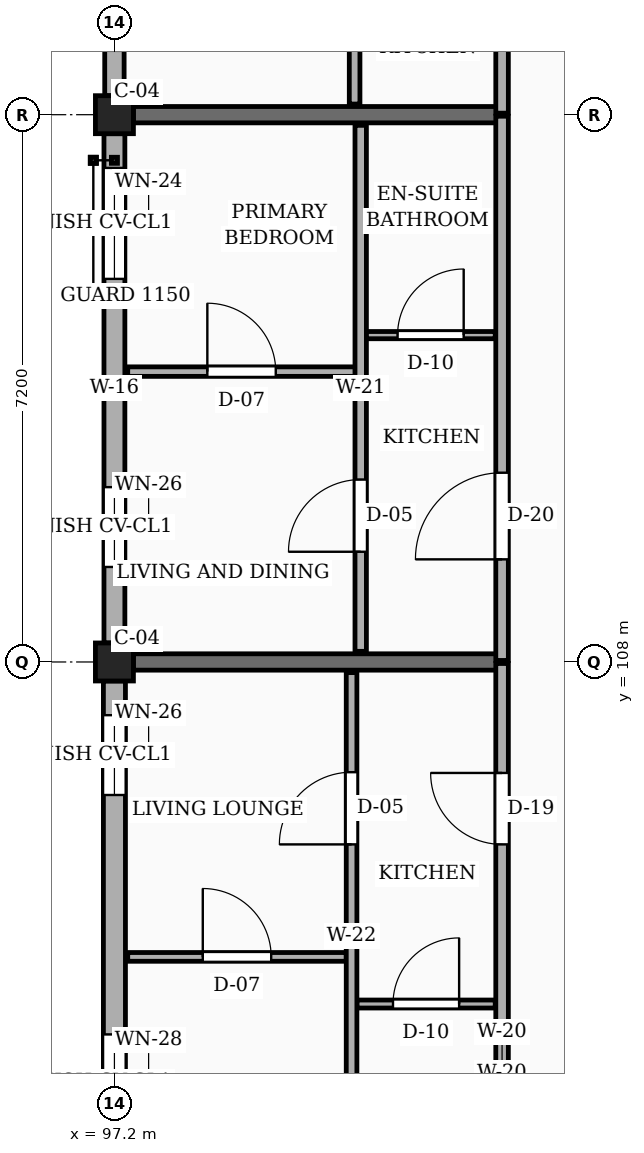
"""IFC4 building model, lengths in metres.
Left out: names, types, materials, properties, quantities, classifications, styles, units other than length and angle.
Written with IfcOpenShell. Run it as: python <this file> out.ifc"""

import sys

from ifc_helpers import new_model, si_unit, direction, frame, frame_2d, origin, origin_2d, place, context, subcontext, project, spatial, rectangle, extrude, element, fill, save


model = new_model("IFC4")
c1 = context("Model", 3, precision=1e-05, world=origin(), true_north=direction((0.0, 1.0)))
c2 = subcontext(c1, "Body", "Model", "MODEL_VIEW")
j1 = project(units=[si_unit("LENGTHUNIT", "METRE"), si_unit("PLANEANGLEUNIT", "RADIAN")], contexts=[c1])
p1 = place(None, origin())
s1 = spatial("IfcSite", under=j1, at=p1, CompositionType="ELEMENT")
p2 = place(p1, origin())
s2 = spatial("IfcBuilding", under=s1, at=p2, CompositionType="ELEMENT")
p3 = place(p2, frame((0.0, 0.0, 26.55)))
s3 = spatial("IfcBuildingStorey", under=s2, at=p3, CompositionType="ELEMENT", Elevation=26.55)
for number, where, z_axis, x_axis in (
    (1, (97.2, 108.0, 0.0), (0.0, 0.0, 1.0), (1.0, 0.0, 0.0)),
    (2, (97.2, 115.2, 0.0), (0.0, 0.0, 1.0), (1.0, 0.0, 0.0)),
):
    element("IfcColumn", number, at=place(p3, frame(where, z_axis=z_axis, x_axis=x_axis)), inside=s3, PredefinedType="COLUMN", context=c2, shape_type="SweptSolid", body=[
        extrude(rectangle(XDim=0.5, YDim=0.5, at=origin_2d()), origin(), (0.0, 0.0, 1.0), 3.15),
    ])
for number, where, z_axis, x_axis in (
    (3, (97.45, 108.0, 0.0), (0.0, 0.0, 1.0), (1.0, 0.0, 0.0)),
    (4, (97.45, 115.2, 0.0), (0.0, 0.0, 1.0), (1.0, 0.0, 0.0)),
):
    element("IfcWall", number, at=place(p3, frame(where, z_axis=z_axis, x_axis=x_axis)), inside=s3, PredefinedType="SOLIDWALL", context=c2, shape_type="SweptSolid", body=[
        extrude(rectangle(XDim=4.85, YDim=0.215, at=frame_2d((2.425, 0.0))), origin(), (0.0, 0.0, 1.0), 2.19),
    ])
p4 = place(p3, frame((97.2, 122.15, 0.0), z_axis=(0.0, 0.0, 1.0), x_axis=(0.0, -1.0, 0.0)))
e5 = element("IfcWall", 5, at=p4, inside=s3, PredefinedType="SOLIDWALL", context=c2, shape_type="SweptSolid", body=[
    extrude(rectangle(XDim=6.7, YDim=0.255, at=frame_2d((3.35, 0.0))), origin(), (0.0, 0.0, 1.0), 2.46),
])
p5 = place(p4, frame((0.45, 0.0, 0.78)))
e6 = element("IfcOpeningElement", 6, at=p5, cuts=e5, PredefinedType="OPENING", context=c2, shape_type="SweptSolid", body=[
    extrude(rectangle(XDim=1.3, YDim=1.36, at=frame_2d((0.65, 0.68))), frame((0.0, 0.137, 0.0), z_axis=(0.0, -1.0, 0.0), x_axis=(1.0, 0.0, 0.0)), (0.0, 0.0, 1.0), 0.275),
])
p6 = place(p4, frame((4.65, 0.0, 0.78)))
e7 = element("IfcOpeningElement", 7, at=p6, cuts=e5, PredefinedType="OPENING", context=c2, shape_type="SweptSolid", body=[
    extrude(rectangle(XDim=1.46, YDim=1.36, at=frame_2d((0.73, 0.68))), frame((0.0, 0.137, 0.0), z_axis=(0.0, -1.0, 0.0), x_axis=(1.0, 0.0, 0.0)), (0.0, 0.0, 1.0), 0.275),
])
p7 = place(p3, frame((97.2, 114.95, 0.0), z_axis=(0.0, 0.0, 1.0), x_axis=(0.0, -1.0, 0.0)))
e8 = element("IfcWall", 8, at=p7, inside=s3, PredefinedType="SOLIDWALL", context=c2, shape_type="SweptSolid", body=[
    extrude(rectangle(XDim=6.7, YDim=0.275, at=frame_2d((3.35, 0.0))), origin(), (0.0, 0.0, 1.0), 2.46),
])
p8 = place(p7, frame((0.45, 0.0, 0.78)))
e9 = element("IfcOpeningElement", 9, at=p8, cuts=e8, PredefinedType="OPENING", context=c2, shape_type="SweptSolid", body=[
    extrude(rectangle(XDim=1.46, YDim=1.36, at=frame_2d((0.73, 0.68))), frame((0.0, 0.147, 0.0), z_axis=(0.0, -1.0, 0.0), x_axis=(1.0, 0.0, 0.0)), (0.0, 0.0, 1.0), 0.295),
])
p9 = place(p7, frame((4.65, 0.0, 0.78)))
e10 = element("IfcOpeningElement", 10, at=p9, cuts=e8, PredefinedType="OPENING", context=c2, shape_type="SweptSolid", body=[
    extrude(rectangle(XDim=1.05, YDim=1.44, at=frame_2d((0.525, 0.72))), frame((0.0, 0.147, 0.0), z_axis=(0.0, -1.0, 0.0), x_axis=(1.0, 0.0, 0.0)), (0.0, 0.0, 1.0), 0.295),
])
p10 = place(p3, frame((97.2, 107.75, 0.0), z_axis=(0.0, 0.0, 1.0), x_axis=(0.0, -1.0, 0.0)))
e11 = element("IfcWall", 11, at=p10, inside=s3, PredefinedType="SOLIDWALL", context=c2, shape_type="SweptSolid", body=[
    extrude(rectangle(XDim=6.7, YDim=0.29, at=frame_2d((3.35, 0.0))), origin(), (0.0, 0.0, 1.0), 2.46),
])
p11 = place(p10, frame((0.45, 0.0, 0.78)))
e12 = element("IfcOpeningElement", 12, at=p11, cuts=e11, PredefinedType="OPENING", context=c2, shape_type="SweptSolid", body=[
    extrude(rectangle(XDim=1.05, YDim=1.44, at=frame_2d((0.525, 0.72))), frame((0.0, 0.155, 0.0), z_axis=(0.0, -1.0, 0.0), x_axis=(1.0, 0.0, 0.0)), (0.0, 0.0, 1.0), 0.31),
])
p12 = place(p10, frame((4.65, 0.0, 0.78)))
e13 = element("IfcOpeningElement", 13, at=p12, cuts=e11, PredefinedType="OPENING", context=c2, shape_type="SweptSolid", body=[
    extrude(rectangle(XDim=1.25, YDim=1.44, at=frame_2d((0.625, 0.72))), frame((0.0, 0.155, 0.0), z_axis=(0.0, -1.0, 0.0), x_axis=(1.0, 0.0, 0.0)), (0.0, 0.0, 1.0), 0.31),
])
p13 = place(p3, frame((102.3, 100.82, 0.0), z_axis=(0.0, 0.0, 1.0), x_axis=(0.0, 1.0, 0.0)))
e14 = element("IfcWall", 14, at=p13, inside=s3, PredefinedType="PARTITIONING", context=c2, shape_type="SweptSolid", body=[
    extrude(rectangle(XDim=7.16, YDim=0.165, at=frame_2d((3.58, 0.0))), origin(), (0.0, 0.0, 1.0), 2.325),
])
p14 = place(p13, frame((4.78, 0.0, 0.0)))
e15 = element("IfcOpeningElement", 15, at=p14, cuts=e14, PredefinedType="OPENING", context=c2, shape_type="SweptSolid", body=[
    extrude(rectangle(XDim=0.94, YDim=2.12, at=frame_2d((0.47, 1.06))), frame((0.0, 0.093, 0.0), z_axis=(0.0, -1.0, 0.0), x_axis=(1.0, 0.0, 0.0)), (0.0, 0.0, 1.0), 0.185),
])
p15 = place(p3, frame((102.3, 108.02, 0.0), z_axis=(0.0, 0.0, 1.0), x_axis=(0.0, 1.0, 0.0)))
e16 = element("IfcWall", 16, at=p15, inside=s3, PredefinedType="PARTITIONING", context=c2, shape_type="SweptSolid", body=[
    extrude(rectangle(XDim=7.16, YDim=0.165, at=frame_2d((3.58, 0.0))), origin(), (0.0, 0.0, 1.0), 2.325),
])
p16 = place(p15, frame((1.33, 0.0, 0.0)))
e17 = element("IfcOpeningElement", 17, at=p16, cuts=e16, PredefinedType="OPENING", context=c2, shape_type="SweptSolid", body=[
    extrude(rectangle(XDim=1.14, YDim=2.18, at=frame_2d((0.57, 1.09))), frame((0.0, 0.093, 0.0), z_axis=(0.0, -1.0, 0.0), x_axis=(1.0, 0.0, 0.0)), (0.0, 0.0, 1.0), 0.185),
])
p17 = place(p3, frame((102.3, 115.22, 0.0), z_axis=(0.0, 0.0, 1.0), x_axis=(0.0, 1.0, 0.0)))
e18 = element("IfcWall", 18, at=p17, inside=s3, PredefinedType="PARTITIONING", context=c2, shape_type="SweptSolid", body=[
    extrude(rectangle(XDim=7.16, YDim=0.165, at=frame_2d((3.58, 0.0))), origin(), (0.0, 0.0, 1.0), 2.325),
])
p18 = place(p17, frame((1.33, 0.0, 0.0)))
e19 = element("IfcOpeningElement", 19, at=p18, cuts=e18, PredefinedType="OPENING", context=c2, shape_type="SweptSolid", body=[
    extrude(rectangle(XDim=1.0, YDim=2.15, at=frame_2d((0.5, 1.075))), frame((0.0, 0.093, 0.0), z_axis=(0.0, -1.0, 0.0), x_axis=(1.0, 0.0, 0.0)), (0.0, 0.0, 1.0), 0.185),
])
p19 = place(p3, frame((97.375, 104.12, 0.0), z_axis=(0.0, 0.0, 1.0), x_axis=(1.0, 0.0, 0.0)))
e20 = element("IfcWall", 20, at=p19, inside=s3, PredefinedType="PARTITIONING", context=c2, shape_type="SweptSolid", body=[
    extrude(rectangle(XDim=2.875, YDim=0.115, at=frame_2d((1.438, 0.0))), origin(), (0.0, 0.0, 1.0), 2.325),
])
p20 = place(p19, frame((0.988, 0.0, 0.0)))
e21 = element("IfcOpeningElement", 21, at=p20, cuts=e20, PredefinedType="OPENING", context=c2, shape_type="SweptSolid", body=[
    extrude(rectangle(XDim=0.9, YDim=2.1, at=frame_2d((0.45, 1.05))), frame((0.0, 0.067, 0.0), z_axis=(0.0, -1.0, 0.0), x_axis=(1.0, 0.0, 0.0)), (0.0, 0.0, 1.0), 0.135),
])
p21 = place(p3, frame((100.39, 103.5, 0.0), z_axis=(0.0, 0.0, 1.0), x_axis=(1.0, 0.0, 0.0)))
e22 = element("IfcWall", 22, at=p21, inside=s3, PredefinedType="PARTITIONING", context=c2, shape_type="SweptSolid", body=[
    extrude(rectangle(XDim=1.82, YDim=0.105, at=frame_2d((0.91, 0.0))), origin(), (0.0, 0.0, 1.0), 2.325),
])
p22 = place(p21, frame((0.475, 0.0, 0.0)))
e23 = element("IfcOpeningElement", 23, at=p22, cuts=e22, PredefinedType="OPENING", context=c2, shape_type="SweptSolid", body=[
    extrude(rectangle(XDim=0.87, YDim=2.05, at=frame_2d((0.435, 1.025))), frame((0.0, 0.062, 0.0), z_axis=(0.0, -1.0, 0.0), x_axis=(1.0, 0.0, 0.0)), (0.0, 0.0, 1.0), 0.125),
])
p23 = place(p3, frame((100.32, 100.94, 0.0), z_axis=(0.0, 0.0, 1.0), x_axis=(0.0, 1.0, 0.0)))
e24 = element("IfcWall", 24, at=p23, inside=s3, PredefinedType="PARTITIONING", context=c2, shape_type="SweptSolid", body=[
    extrude(rectangle(XDim=6.92, YDim=0.14, at=frame_2d((3.46, 0.0))), origin(), (0.0, 0.0, 1.0), 2.325),
])
p24 = place(p23, frame((4.66, 0.0, 0.0)))
e25 = element("IfcOpeningElement", 25, at=p24, cuts=e24, PredefinedType="OPENING", context=c2, shape_type="SweptSolid", body=[
    extrude(rectangle(XDim=0.95, YDim=2.1, at=frame_2d((0.475, 1.05))), frame((0.0, 0.08, 0.0), z_axis=(0.0, -1.0, 0.0), x_axis=(1.0, 0.0, 0.0)), (0.0, 0.0, 1.0), 0.16),
])
p25 = place(p3, frame((97.375, 111.82, 0.0), z_axis=(0.0, 0.0, 1.0), x_axis=(1.0, 0.0, 0.0)))
e26 = element("IfcWall", 26, at=p25, inside=s3, PredefinedType="PARTITIONING", context=c2, shape_type="SweptSolid", body=[
    extrude(rectangle(XDim=2.995, YDim=0.125, at=frame_2d((1.498, 0.0))), origin(), (0.0, 0.0, 1.0), 2.325),
])
p26 = place(p25, frame((1.048, 0.0, 0.0)))
e27 = element("IfcOpeningElement", 27, at=p26, cuts=e26, PredefinedType="OPENING", context=c2, shape_type="SweptSolid", body=[
    extrude(rectangle(XDim=0.9, YDim=2.1, at=frame_2d((0.45, 1.05))), frame((0.0, 0.073, 0.0), z_axis=(0.0, -1.0, 0.0), x_axis=(1.0, 0.0, 0.0)), (0.0, 0.0, 1.0), 0.145),
])
p27 = place(p3, frame((100.51, 112.3, 0.0), z_axis=(0.0, 0.0, 1.0), x_axis=(1.0, 0.0, 0.0)))
e28 = element("IfcWall", 28, at=p27, inside=s3, PredefinedType="PARTITIONING", context=c2, shape_type="SweptSolid", body=[
    extrude(rectangle(XDim=1.7, YDim=0.095, at=frame_2d((0.85, 0.0))), origin(), (0.0, 0.0, 1.0), 2.325),
])
p28 = place(p27, frame((0.415, 0.0, 0.0)))
e29 = element("IfcOpeningElement", 29, at=p28, cuts=e28, PredefinedType="OPENING", context=c2, shape_type="SweptSolid", body=[
    extrude(rectangle(XDim=0.87, YDim=2.05, at=frame_2d((0.435, 1.025))), frame((0.0, 0.058, 0.0), z_axis=(0.0, -1.0, 0.0), x_axis=(1.0, 0.0, 0.0)), (0.0, 0.0, 1.0), 0.115),
])
p29 = place(p3, frame((100.44, 108.14, 0.0), z_axis=(0.0, 0.0, 1.0), x_axis=(0.0, 1.0, 0.0)))
e30 = element("IfcWall", 30, at=p29, inside=s3, PredefinedType="PARTITIONING", context=c2, shape_type="SweptSolid", body=[
    extrude(rectangle(XDim=6.92, YDim=0.15, at=frame_2d((3.46, 0.0))), origin(), (0.0, 0.0, 1.0), 2.325),
])
p30 = place(p29, frame((1.31, 0.0, 0.0)))
e31 = element("IfcOpeningElement", 31, at=p30, cuts=e30, PredefinedType="OPENING", context=c2, shape_type="SweptSolid", body=[
    extrude(rectangle(XDim=0.95, YDim=2.1, at=frame_2d((0.475, 1.05))), frame((0.0, 0.085, 0.0), z_axis=(0.0, -1.0, 0.0), x_axis=(1.0, 0.0, 0.0)), (0.0, 0.0, 1.0), 0.17),
])
p31 = place(p3, frame((100.36, 115.34, 0.0), z_axis=(0.0, 0.0, 1.0), x_axis=(0.0, 1.0, 0.0)))
e32 = element("IfcWall", 32, at=p31, inside=s3, PredefinedType="PARTITIONING", context=c2, shape_type="SweptSolid", body=[
    extrude(rectangle(XDim=6.92, YDim=0.14, at=frame_2d((3.46, 0.0))), origin(), (0.0, 0.0, 1.0), 2.325),
])
p32 = place(p31, frame((1.31, 0.0, 0.0)))
e33 = element("IfcOpeningElement", 33, at=p32, cuts=e32, PredefinedType="OPENING", context=c2, shape_type="SweptSolid", body=[
    extrude(rectangle(XDim=0.92, YDim=2.1, at=frame_2d((0.46, 1.05))), frame((0.0, 0.08, 0.0), z_axis=(0.0, -1.0, 0.0), x_axis=(1.0, 0.0, 0.0)), (0.0, 0.0, 1.0), 0.16),
])
p33 = place(p8, origin())
e34 = element("IfcWindow", 34, at=p33, inside=s3, PartitioningType="SINGLE_PANEL", PredefinedType="WINDOW", context=c2, shape_type="SweptSolid", body=[
    extrude(rectangle(XDim=1.46, YDim=1.36, at=frame_2d((0.73, 0.68))), frame((0.0, 0.03, 0.0), z_axis=(0.0, -1.0, 0.0), x_axis=(1.0, 0.0, 0.0)), (0.0, 0.0, 1.0), 0.06),
])
fill(e9, e34)
p34 = place(p9, origin())
e35 = element("IfcWindow", 35, at=p34, inside=s3, PartitioningType="SINGLE_PANEL", PredefinedType="WINDOW", context=c2, shape_type="SweptSolid", body=[
    extrude(rectangle(XDim=1.05, YDim=1.44, at=frame_2d((0.525, 0.72))), frame((0.0, 0.03, 0.0), z_axis=(0.0, -1.0, 0.0), x_axis=(1.0, 0.0, 0.0)), (0.0, 0.0, 1.0), 0.06),
])
fill(e10, e35)
p35 = place(p11, origin())
e36 = element("IfcWindow", 36, at=p35, inside=s3, PartitioningType="SINGLE_PANEL", PredefinedType="WINDOW", context=c2, shape_type="SweptSolid", body=[
    extrude(rectangle(XDim=1.05, YDim=1.44, at=frame_2d((0.525, 0.72))), frame((0.0, 0.03, 0.0), z_axis=(0.0, -1.0, 0.0), x_axis=(1.0, 0.0, 0.0)), (0.0, 0.0, 1.0), 0.06),
])
fill(e12, e36)
p36 = place(p12, origin())
e37 = element("IfcWindow", 37, at=p36, inside=s3, PartitioningType="SINGLE_PANEL", PredefinedType="WINDOW", context=c2, shape_type="SweptSolid", body=[
    extrude(rectangle(XDim=1.25, YDim=1.44, at=frame_2d((0.625, 0.72))), frame((0.0, 0.03, 0.0), z_axis=(0.0, -1.0, 0.0), x_axis=(1.0, 0.0, 0.0)), (0.0, 0.0, 1.0), 0.06),
])
fill(e13, e37)
p37 = place(p14, origin())
e38 = element("IfcDoor", 38, at=p37, inside=s3, OperationType="SINGLE_SWING_RIGHT", PredefinedType="DOOR", context=c2, shape_type="SweptSolid", body=[
    extrude(rectangle(XDim=0.94, YDim=2.12, at=frame_2d((0.47, 1.06))), frame((0.0, 0.025, 0.0), z_axis=(0.0, -1.0, 0.0), x_axis=(1.0, 0.0, 0.0)), (0.0, 0.0, 1.0), 0.05),
])
fill(e15, e38)
p38 = place(p16, origin())
e39 = element("IfcDoor", 39, at=p38, inside=s3, OperationType="SINGLE_SWING_LEFT", PredefinedType="DOOR", context=c2, shape_type="SweptSolid", body=[
    extrude(rectangle(XDim=1.14, YDim=2.18, at=frame_2d((0.57, 1.09))), frame((0.0, 0.025, 0.0), z_axis=(0.0, -1.0, 0.0), x_axis=(1.0, 0.0, 0.0)), (0.0, 0.0, 1.0), 0.05),
])
fill(e17, e39)
p39 = place(p20, origin())
e40 = element("IfcDoor", 40, at=p39, inside=s3, OperationType="SINGLE_SWING_LEFT", PredefinedType="DOOR", context=c2, shape_type="SweptSolid", body=[
    extrude(rectangle(XDim=0.9, YDim=2.1, at=frame_2d((0.45, 1.05))), frame((0.0, 0.025, 0.0), z_axis=(0.0, -1.0, 0.0), x_axis=(1.0, 0.0, 0.0)), (0.0, 0.0, 1.0), 0.05),
])
fill(e21, e40)
p40 = place(p22, origin())
e41 = element("IfcDoor", 41, at=p40, inside=s3, OperationType="SINGLE_SWING_RIGHT", PredefinedType="DOOR", context=c2, shape_type="SweptSolid", body=[
    extrude(rectangle(XDim=0.87, YDim=2.05, at=frame_2d((0.435, 1.025))), frame((0.0, 0.025, 0.0), z_axis=(0.0, -1.0, 0.0), x_axis=(1.0, 0.0, 0.0)), (0.0, 0.0, 1.0), 0.05),
])
fill(e23, e41)
p41 = place(p24, origin())
e42 = element("IfcDoor", 42, at=p41, inside=s3, OperationType="SINGLE_SWING_LEFT", PredefinedType="DOOR", context=c2, shape_type="SweptSolid", body=[
    extrude(rectangle(XDim=0.95, YDim=2.1, at=frame_2d((0.475, 1.05))), frame((0.0, 0.025, 0.0), z_axis=(0.0, -1.0, 0.0), x_axis=(1.0, 0.0, 0.0)), (0.0, 0.0, 1.0), 0.05),
])
fill(e25, e42)
p42 = place(p26, origin())
e43 = element("IfcDoor", 43, at=p42, inside=s3, OperationType="SINGLE_SWING_LEFT", PredefinedType="DOOR", context=c2, shape_type="SweptSolid", body=[
    extrude(rectangle(XDim=0.9, YDim=2.1, at=frame_2d((0.45, 1.05))), frame((0.0, 0.025, 0.0), z_axis=(0.0, -1.0, 0.0), x_axis=(1.0, 0.0, 0.0)), (0.0, 0.0, 1.0), 0.05),
])
fill(e27, e43)
p43 = place(p28, origin())
e44 = element("IfcDoor", 44, at=p43, inside=s3, OperationType="SINGLE_SWING_RIGHT", PredefinedType="DOOR", context=c2, shape_type="SweptSolid", body=[
    extrude(rectangle(XDim=0.87, YDim=2.05, at=frame_2d((0.435, 1.025))), frame((0.0, 0.025, 0.0), z_axis=(0.0, -1.0, 0.0), x_axis=(1.0, 0.0, 0.0)), (0.0, 0.0, 1.0), 0.05),
])
fill(e29, e44)
p44 = place(p30, origin())
e45 = element("IfcDoor", 45, at=p44, inside=s3, OperationType="SINGLE_SWING_LEFT", PredefinedType="DOOR", context=c2, shape_type="SweptSolid", body=[
    extrude(rectangle(XDim=0.95, YDim=2.1, at=frame_2d((0.475, 1.05))), frame((0.0, 0.025, 0.0), z_axis=(0.0, -1.0, 0.0), x_axis=(1.0, 0.0, 0.0)), (0.0, 0.0, 1.0), 0.05),
])
fill(e31, e45)
save(model, sys.argv[1])
